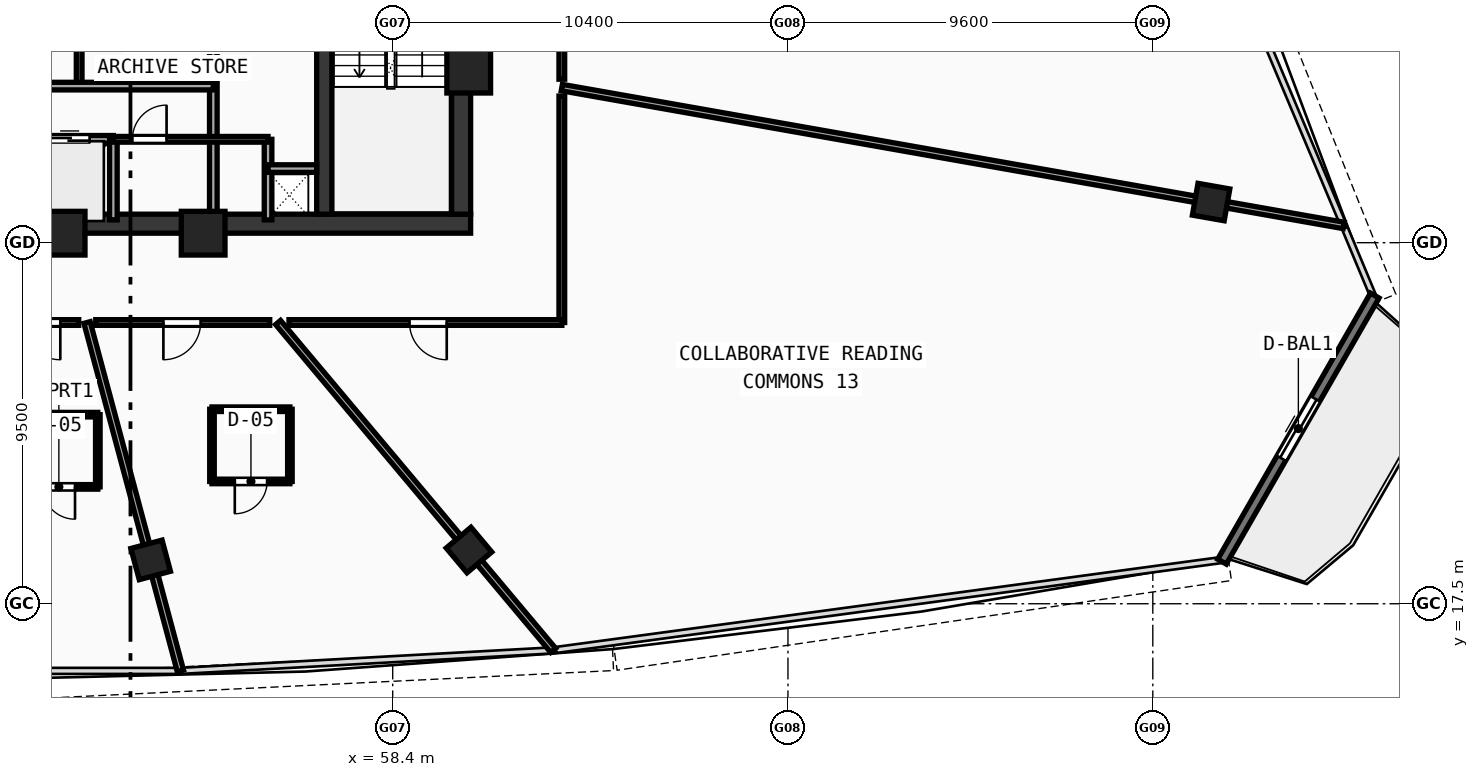
"""IFC4 building model, lengths in metres.
Left out: names, types, materials, properties, quantities, classifications, styles, units other than length and angle.
Written with IfcOpenShell. Run it as: python <this file> out.ifc"""

import sys

from ifc_helpers import new_model, si_unit, direction, frame, frame_2d, origin, origin_with_axes, origin_2d, place, context, subcontext, project, spatial, rectangle, hollow_rectangle, extrude, source, transform, mapped, element, fill, save


model = new_model("IFC4")
c1 = context("Model", 3, precision=1e-05, world=origin(), true_north=direction((0.0, 1.0)))
c2 = subcontext(c1, "Body", "Model", "MODEL_VIEW")
j1 = project(units=[si_unit("LENGTHUNIT", "METRE"), si_unit("PLANEANGLEUNIT", "RADIAN")], contexts=[c1])
p1 = place(None, origin())
s1 = spatial("IfcSite", under=j1, at=p1, CompositionType="ELEMENT")
p2 = place(p1, origin())
s2 = spatial("IfcBuilding", under=s1, at=p2, CompositionType="ELEMENT")
p3 = place(p2, frame((0.0, 0.0, 229.61)))
s3 = spatial("IfcBuildingStorey", under=s2, at=p3, CompositionType="ELEMENT", Elevation=229.61)
p4 = place(p3, frame((35.55, 27.5, 0.0), z_axis=(0.0, 0.0, 1.0), x_axis=(1.0, 0.0, 0.0)))
e1 = element("IfcWall", 1, at=p4, inside=s3, PredefinedType="SHEAR", context=c2, shape_type="SweptSolid", body=[
    extrude(rectangle(XDim=24.9, YDim=0.5, at=frame_2d((12.45, 0.0))), origin(), (0.0, 0.0, 1.0), 3.47),
])
p5 = place(p3, frame((60.2, 27.75, 0.0), z_axis=(0.0, 0.0, 1.0), x_axis=(0.0, 1.0, 0.0)))
e2 = element("IfcWall", 2, at=p5, inside=s3, PredefinedType="SHEAR", context=c2, shape_type="SweptSolid", body=[
    extrude(rectangle(XDim=12.2, YDim=0.5, at=frame_2d((6.1, 0.0))), origin(), (0.0, 0.0, 1.0), 3.47),
])
p6 = place(p3, frame((56.6, 27.75, 0.0), z_axis=(0.0, 0.0, 1.0), x_axis=(0.0, 1.0, 0.0)))
e3 = element("IfcWall", 3, at=p6, inside=s3, PredefinedType="SHEAR", context=c2, shape_type="SweptSolid", body=[
    extrude(rectangle(XDim=12.2, YDim=0.4, at=frame_2d((6.1, 0.0))), origin(), (0.0, 0.0, 1.0), 3.47),
])
p7 = place(p6, frame((10.0, 0.0, 0.0)))
e4 = element("IfcOpeningElement", 4, at=p7, cuts=e3, PredefinedType="OPENING", context=c2, shape_type="SweptSolid", body=[
    extrude(rectangle(XDim=1.1, YDim=2.1, at=frame_2d((0.55, 1.05))), frame((0.0, 0.21, 0.0), z_axis=(0.0, -1.0, 0.0), x_axis=(1.0, 0.0, 0.0)), (0.0, 0.0, 1.0), 0.42),
])
m1 = source(origin(), c2, "Body", "SweptSolid", [
    extrude(hollow_rectangle(XDim=1.15, YDim=1.15, WallThickness=0.048, at=origin_2d()), origin(), (0.0, 0.0, 1.0), 3.73),
])
for number, where, z_axis, x_axis in (
    (5, (49.729, 27.25, -0.26), (0.0, 0.0, 1.0), (1.0, 0.0, 0.0)),
    (6, (53.412, 27.25, -0.26), (0.0, 0.0, 1.0), (1.0, 0.0, 0.0)),
    (7, (60.4, 31.513, -0.26), (0.0, 0.0, 1.0), (1.0, 0.0, 0.0)),
):
    element("IfcColumn", number, at=place(p3, frame(where, z_axis=z_axis, x_axis=x_axis)), inside=s3, PredefinedType="COLUMN", context=c2, shape_type="MappedRepresentation", body=[
        mapped(m1, transform((0.0, 0.0, 0.0), scale=1.0)),
    ])
m2 = source(origin(), c2, "Body", "SweptSolid", [
    extrude(hollow_rectangle(XDim=0.85, YDim=0.85, WallThickness=0.034, at=origin_2d()), origin(), (0.0, 0.0, 1.0), 3.73),
])
for number, where, z_axis, x_axis in (
    (8, (52.031, 18.654, -0.26), (0.0, 0.0, 1.0), (0.966, 0.259, 0.0)),
    (9, (60.407, 18.914, -0.26), (0.0, 0.0, 1.0), (0.766, 0.643, 0.0)),
    (10, (79.934, 28.069, -0.26), (0.0, 0.0, 1.0), (0.174, 0.985, 0.0)),
):
    element("IfcColumn", number, at=place(p3, frame(where, z_axis=z_axis, x_axis=x_axis)), inside=s3, PredefinedType="COLUMN", context=c2, shape_type="MappedRepresentation", body=[
        mapped(m2, transform((0.0, 0.0, 0.0), scale=1.0)),
    ])
p8 = place(p3, frame((80.22, 18.608, 0.0), z_axis=(0.0, 0.0, 1.0), x_axis=(0.49791595327, 0.867225289921, 0.0)))
e11 = element("IfcWall", 11, at=p8, inside=s3, PredefinedType="STANDARD", context=c2, shape_type="SweptSolid", body=[
    extrude(rectangle(XDim=8.074, YDim=0.26, at=frame_2d((4.037, 0.0))), origin(), (0.0, 0.0, 1.0), 3.47),
])
p9 = place(p8, frame((3.137, 0.0, 0.0)))
e12 = element("IfcOpeningElement", 12, at=p9, cuts=e11, PredefinedType="OPENING", context=c2, shape_type="SweptSolid", body=[
    extrude(rectangle(XDim=1.8, YDim=2.15, at=frame_2d((0.9, 1.075))), frame((0.0, 0.14, 0.0), z_axis=(0.0, -1.0, 0.0), x_axis=(1.0, 0.0, 0.0)), (0.0, 0.0, 1.0), 0.28),
])
p10 = place(p3, frame((53.68, 27.6, 0.0), z_axis=(0.0, 0.0, 1.0), x_axis=(0.0, 1.0, 0.0)))
e13 = element("IfcWall", 13, at=p10, inside=s3, PredefinedType="SOLIDWALL", context=c2, shape_type="SweptSolid", body=[
    extrude(rectangle(XDim=9.05, YDim=0.2, at=frame_2d((4.525, 0.0))), origin(), (0.0, 0.0, 1.0), 3.47),
])
p11 = place(p10, frame((6.9, 0.0, 0.0)))
e14 = element("IfcOpeningElement", 14, at=p11, cuts=e13, PredefinedType="OPENING", context=c2, shape_type="SweptSolid", body=[
    extrude(rectangle(XDim=1.05, YDim=2.1, at=frame_2d((0.525, 1.05))), frame((0.0, 0.11, 0.0), z_axis=(0.0, -1.0, 0.0), x_axis=(1.0, 0.0, 0.0)), (0.0, 0.0, 1.0), 0.22),
])
p12 = place(p3, frame((50.15, 31.12, 0.0), z_axis=(0.0, 0.0, 1.0), x_axis=(0.0, 1.0, 0.0)))
e15 = element("IfcWall", 15, at=p12, inside=s3, PredefinedType="PARTITIONING", context=c2, shape_type="SweptSolid", body=[
    extrude(rectangle(XDim=2.7, YDim=0.15, at=frame_2d((1.35, 0.0))), origin(), (0.0, 0.0, 1.0), 3.47),
])
p13 = place(p3, frame((43.85, 29.72, 0.0), z_axis=(0.0, 0.0, 1.0), x_axis=(1.0, 0.0, 0.0)))
e16 = element("IfcWall", 16, at=p13, inside=s3, PredefinedType="SOLIDWALL", context=c2, shape_type="SweptSolid", body=[
    extrude(rectangle(XDim=7.2, YDim=0.2, at=frame_2d((3.6, 0.0))), origin(), (0.0, 0.0, 1.0), 3.47),
])
p14 = place(p13, frame((0.625, 0.0, 0.0)))
e17 = element("IfcOpeningElement", 17, at=p14, cuts=e16, PredefinedType="OPENING", context=c2, shape_type="SweptSolid", body=[
    extrude(rectangle(XDim=1.05, YDim=2.1, at=frame_2d((0.525, 1.05))), frame((0.0, 0.11, 0.0), z_axis=(0.0, -1.0, 0.0), x_axis=(1.0, 0.0, 0.0)), (0.0, 0.0, 1.0), 0.22),
])
p15 = place(p13, frame((3.075, 0.0, 0.0)))
e18 = element("IfcOpeningElement", 18, at=p15, cuts=e16, PredefinedType="OPENING", context=c2, shape_type="SweptSolid", body=[
    extrude(rectangle(XDim=1.05, YDim=2.1, at=frame_2d((0.525, 1.05))), frame((0.0, 0.11, 0.0), z_axis=(0.0, -1.0, 0.0), x_axis=(1.0, 0.0, 0.0)), (0.0, 0.0, 1.0), 0.22),
])
p16 = place(p13, frame((5.525, 0.0, 0.0)))
e19 = element("IfcOpeningElement", 19, at=p16, cuts=e16, PredefinedType="OPENING", context=c2, shape_type="SweptSolid", body=[
    extrude(rectangle(XDim=1.05, YDim=2.1, at=frame_2d((0.525, 1.05))), frame((0.0, 0.11, 0.0), z_axis=(0.0, -1.0, 0.0), x_axis=(1.0, 0.0, 0.0)), (0.0, 0.0, 1.0), 0.22),
])
p17 = place(p3, frame((51.05, 27.6, 0.0), z_axis=(0.0, 0.0, 1.0), x_axis=(0.0, 1.0, 0.0)))
e20 = element("IfcWall", 20, at=p17, inside=s3, PredefinedType="SOLIDWALL", context=c2, shape_type="SweptSolid", body=[
    extrude(rectangle(XDim=2.12, YDim=0.2, at=frame_2d((1.06, 0.0))), origin(), (0.0, 0.0, 1.0), 3.47),
])
p18 = place(p3, frame((43.85, 31.12, 0.0), z_axis=(0.0, 0.0, 1.0), x_axis=(1.0, 0.0, 0.0)))
e21 = element("IfcWall", 21, at=p18, inside=s3, PredefinedType="SOLIDWALL", context=c2, shape_type="SweptSolid", body=[
    extrude(rectangle(XDim=9.83, YDim=0.2, at=frame_2d((4.915, 0.0))), origin(), (0.0, 0.0, 1.0), 3.47),
])
p19 = place(p3, frame((55.12, 27.6, 0.0), z_axis=(0.0, 0.0, 1.0), x_axis=(0.0, 1.0, 0.0)))
e22 = element("IfcWall", 22, at=p19, inside=s3, PredefinedType="SOLIDWALL", context=c2, shape_type="SweptSolid", body=[
    extrude(rectangle(XDim=2.12, YDim=0.2, at=frame_2d((1.06, 0.0))), origin(), (0.0, 0.0, 1.0), 3.47),
])
p20 = place(p3, frame((55.12, 28.95, 0.0), z_axis=(0.0, 0.0, 1.0), x_axis=(1.0, 0.0, 0.0)))
e23 = element("IfcWall", 23, at=p20, inside=s3, PredefinedType="SOLIDWALL", context=c2, shape_type="SweptSolid", body=[
    extrude(rectangle(XDim=1.28, YDim=0.2, at=frame_2d((0.64, 0.0))), origin(), (0.0, 0.0, 1.0), 3.47),
])
p21 = place(p3, frame((51.05, 29.72, 0.0), z_axis=(0.0, 0.0, 1.0), x_axis=(1.0, 0.0, 0.0)))
e24 = element("IfcWall", 24, at=p21, inside=s3, PredefinedType="PARTITIONING", context=c2, shape_type="SweptSolid", body=[
    extrude(rectangle(XDim=4.07, YDim=0.15, at=frame_2d((2.035, 0.0))), origin(), (0.0, 0.0, 1.0), 3.47),
])
p22 = place(p21, frame((0.5, 0.0, 0.0)))
e25 = element("IfcOpeningElement", 25, at=p22, cuts=e24, PredefinedType="OPENING", context=c2, shape_type="SweptSolid", body=[
    extrude(rectangle(XDim=0.9, YDim=2.1, at=frame_2d((0.45, 1.05))), frame((0.0, 0.085, 0.0), z_axis=(0.0, -1.0, 0.0), x_axis=(1.0, 0.0, 0.0)), (0.0, 0.0, 1.0), 0.17),
])
p23 = place(p3, frame((50.358, 24.9, 0.0), z_axis=(0.0, 0.0, 1.0), x_axis=(0.258832957733, -0.965922098304, 0.0)))
e26 = element("IfcWall", 26, at=p23, inside=s3, PredefinedType="PARTITIONING", context=c2, shape_type="SweptSolid", body=[
    extrude(rectangle(XDim=9.49, YDim=0.17, at=frame_2d((4.745, 0.0))), origin(), (0.0, 0.0, 1.0), 2.82),
])
p24 = place(p3, frame((55.384, 24.9, 0.0), z_axis=(0.0, 0.0, 1.0), x_axis=(0.642803558478, -0.766031060211, 0.0)))
e27 = element("IfcWall", 27, at=p24, inside=s3, PredefinedType="PARTITIONING", context=c2, shape_type="SweptSolid", body=[
    extrude(rectangle(XDim=11.261, YDim=0.17, at=frame_2d((5.631, 0.0))), origin(), (0.0, 0.0, 1.0), 2.82),
])
p25 = place(p3, frame((62.85, 31.082, 0.0), z_axis=(0.0, 0.0, 1.0), x_axis=(0.984808138799, -0.17364598975, 0.0)))
e28 = element("IfcWall", 28, at=p25, inside=s3, PredefinedType="PARTITIONING", context=c2, shape_type="SweptSolid", body=[
    extrude(rectangle(XDim=20.89, YDim=0.17, at=frame_2d((10.445, 0.0))), origin(), (0.0, 0.0, 1.0), 2.82),
])
p26 = place(p3, frame((62.85, 40.723, 0.0), z_axis=(0.0, 0.0, 1.0), x_axis=(0.0, -1.0, 0.0)))
e29 = element("IfcWall", 29, at=p26, inside=s3, PredefinedType="PARTITIONING", context=c2, shape_type="SweptSolid", body=[
    extrude(rectangle(XDim=9.422, YDim=0.15, at=frame_2d((4.711, 0.0))), origin(), (0.0, 0.0, 1.0), 2.82),
])
p27 = place(p26, frame((4.236, 0.0, 0.0)))
e30 = element("IfcOpeningElement", 30, at=p27, cuts=e29, PredefinedType="OPENING", context=c2, shape_type="SweptSolid", body=[
    extrude(rectangle(XDim=0.98, YDim=2.12, at=frame_2d((0.49, 1.06))), frame((0.0, 0.085, 0.0), z_axis=(0.0, -1.0, 0.0), x_axis=(1.0, 0.0, 0.0)), (0.0, 0.0, 1.0), 0.17),
])
p28 = place(p3, frame((62.85, 30.858, 0.0), z_axis=(0.0, 0.0, 1.0), x_axis=(0.0, -1.0, 0.0)))
e31 = element("IfcWall", 31, at=p28, inside=s3, PredefinedType="PARTITIONING", context=c2, shape_type="SweptSolid", body=[
    extrude(rectangle(XDim=5.958, YDim=0.15, at=frame_2d((2.979, 0.0))), origin(), (0.0, 0.0, 1.0), 3.12),
])
p29 = place(p3, frame((62.85, 24.9, 0.0), z_axis=(0.0, 0.0, 1.0), x_axis=(-1.0, 0.0, 0.0)))
e32 = element("IfcWall", 32, at=p29, inside=s3, PredefinedType="PARTITIONING", context=c2, shape_type="SweptSolid", body=[
    extrude(rectangle(XDim=7.179, YDim=0.15, at=frame_2d((3.589, 0.0))), origin(), (0.0, 0.0, 1.0), 3.12),
])
p30 = place(p29, frame((3.028, 0.0, 0.0)))
e33 = element("IfcOpeningElement", 33, at=p30, cuts=e32, PredefinedType="OPENING", context=c2, shape_type="SweptSolid", body=[
    extrude(rectangle(XDim=0.98, YDim=2.12, at=frame_2d((0.49, 1.06))), frame((0.0, 0.085, 0.0), z_axis=(0.0, -1.0, 0.0), x_axis=(1.0, 0.0, 0.0)), (0.0, 0.0, 1.0), 0.17),
])
p31 = place(p3, frame((55.164, 24.9, 0.0), z_axis=(0.0, 0.0, 1.0), x_axis=(-1.0, 0.0, 0.0)))
e34 = element("IfcWall", 34, at=p31, inside=s3, PredefinedType="PARTITIONING", context=c2, shape_type="SweptSolid", body=[
    extrude(rectangle(XDim=4.579, YDim=0.15, at=frame_2d((2.289, 0.0))), origin(), (0.0, 0.0, 1.0), 2.82),
])
p32 = place(p31, frame((1.818, 0.0, 0.0)))
e35 = element("IfcOpeningElement", 35, at=p32, cuts=e34, PredefinedType="OPENING", context=c2, shape_type="SweptSolid", body=[
    extrude(rectangle(XDim=0.98, YDim=2.12, at=frame_2d((0.49, 1.06))), frame((0.0, 0.085, 0.0), z_axis=(0.0, -1.0, 0.0), x_axis=(1.0, 0.0, 0.0)), (0.0, 0.0, 1.0), 0.17),
])
p33 = place(p3, frame((50.138, 24.9, 0.0), z_axis=(0.0, 0.0, 1.0), x_axis=(-1.0, 0.0, 0.0)))
e36 = element("IfcWall", 36, at=p33, inside=s3, PredefinedType="PARTITIONING", context=c2, shape_type="SweptSolid", body=[
    extrude(rectangle(XDim=1.918, YDim=0.15, at=frame_2d((0.959, 0.0))), origin(), (0.0, 0.0, 1.0), 3.47),
])
p34 = place(p33, frame((0.484, 0.0, 0.0)))
e37 = element("IfcOpeningElement", 37, at=p34, cuts=e36, PredefinedType="OPENING", context=c2, shape_type="SweptSolid", body=[
    extrude(rectangle(XDim=0.98, YDim=2.12, at=frame_2d((0.49, 1.06))), frame((0.0, 0.085, 0.0), z_axis=(0.0, -1.0, 0.0), x_axis=(1.0, 0.0, 0.0)), (0.0, 0.0, 1.0), 0.17),
])
p35 = place(p3, frame((48.591, 20.575, 0.0), z_axis=(0.0, 0.0, 1.0), x_axis=(1.0, 0.0, 0.0)))
e38 = element("IfcWall", 38, at=p35, inside=s3, PredefinedType="PARTITIONING", context=c2, shape_type="SweptSolid", body=[
    extrude(rectangle(XDim=2.05, YDim=0.12, at=frame_2d((1.025, 0.0))), origin(), (0.0, 0.0, 1.0), 3.47),
])
p36 = place(p35, frame((0.6, 0.0, 0.0)))
e39 = element("IfcOpeningElement", 39, at=p36, cuts=e38, PredefinedType="OPENING", context=c2, shape_type="SweptSolid", body=[
    extrude(rectangle(XDim=0.85, YDim=2.1, at=frame_2d((0.425, 1.05))), frame((0.0, 0.07, 0.0), z_axis=(0.0, -1.0, 0.0), x_axis=(1.0, 0.0, 0.0)), (0.0, 0.0, 1.0), 0.14),
])
p37 = place(p3, frame((50.641, 20.575, 0.0), z_axis=(0.0, 0.0, 1.0), x_axis=(0.0, 1.0, 0.0)))
e40 = element("IfcWall", 40, at=p37, inside=s3, PredefinedType="PARTITIONING", context=c2, shape_type="SweptSolid", body=[
    extrude(rectangle(XDim=1.9, YDim=0.12, at=frame_2d((0.95, 0.0))), origin(), (0.0, 0.0, 1.0), 3.12),
])
p38 = place(p3, frame((50.641, 22.475, 0.0), z_axis=(0.0, 0.0, 1.0), x_axis=(-1.0, 0.0, 0.0)))
e41 = element("IfcWall", 41, at=p38, inside=s3, PredefinedType="PARTITIONING", context=c2, shape_type="SweptSolid", body=[
    extrude(rectangle(XDim=2.05, YDim=0.12, at=frame_2d((1.025, 0.0))), origin(), (0.0, 0.0, 1.0), 3.47),
])
p39 = place(p3, frame((53.645, 20.718, 0.0), z_axis=(0.0, 0.0, 1.0), x_axis=(1.0, 0.0, 0.0)))
e42 = element("IfcWall", 42, at=p39, inside=s3, PredefinedType="PARTITIONING", context=c2, shape_type="SweptSolid", body=[
    extrude(rectangle(XDim=2.05, YDim=0.12, at=frame_2d((1.025, 0.0))), origin(), (0.0, 0.0, 1.0), 3.47),
])
p40 = place(p39, frame((0.6, 0.0, 0.0)))
e43 = element("IfcOpeningElement", 43, at=p40, cuts=e42, PredefinedType="OPENING", context=c2, shape_type="SweptSolid", body=[
    extrude(rectangle(XDim=0.85, YDim=2.1, at=frame_2d((0.425, 1.05))), frame((0.0, 0.07, 0.0), z_axis=(0.0, -1.0, 0.0), x_axis=(1.0, 0.0, 0.0)), (0.0, 0.0, 1.0), 0.14),
])
p41 = place(p3, frame((55.695, 20.718, 0.0), z_axis=(0.0, 0.0, 1.0), x_axis=(0.0, 1.0, 0.0)))
e44 = element("IfcWall", 44, at=p41, inside=s3, PredefinedType="PARTITIONING", context=c2, shape_type="SweptSolid", body=[
    extrude(rectangle(XDim=1.9, YDim=0.12, at=frame_2d((0.95, 0.0))), origin(), (0.0, 0.0, 1.0), 3.12),
])
p42 = place(p3, frame((55.695, 22.618, 0.0), z_axis=(0.0, 0.0, 1.0), x_axis=(-1.0, 0.0, 0.0)))
e45 = element("IfcWall", 45, at=p42, inside=s3, PredefinedType="PARTITIONING", context=c2, shape_type="SweptSolid", body=[
    extrude(rectangle(XDim=2.05, YDim=0.12, at=frame_2d((1.025, 0.0))), origin(), (0.0, 0.0, 1.0), 3.47),
])
p43 = place(p3, frame((53.645, 22.618, 0.0), z_axis=(0.0, 0.0, 1.0), x_axis=(0.0, -1.0, 0.0)))
e46 = element("IfcWall", 46, at=p43, inside=s3, PredefinedType="PARTITIONING", context=c2, shape_type="SweptSolid", body=[
    extrude(rectangle(XDim=1.9, YDim=0.12, at=frame_2d((0.95, 0.0))), origin(), (0.0, 0.0, 1.0), 3.12),
])
m3 = source(origin(), c2, "Body", "SweptSolid", [
    extrude(rectangle(XDim=1.8, YDim=2.15, at=frame_2d((0.9, 1.075))), frame((0.0, 0.025, 0.0), z_axis=(0.0, -1.0, 0.0), x_axis=(1.0, 0.0, 0.0)), (0.0, 0.0, 1.0), 0.05),
])
p44 = place(p9, origin_with_axes())
e47 = element("IfcDoor", 47, at=p44, inside=s3, OperationType="DOUBLE_DOOR_SLIDING", PredefinedType="DOOR", context=c2, shape_type="MappedRepresentation", body=[
    mapped(m3, transform((0.0, 0.0, 0.0), scale=1.0)),
])
fill(e12, e47)
m4 = source(origin(), c2, "Body", "SweptSolid", [
    extrude(rectangle(XDim=1.05, YDim=2.1, at=frame_2d((0.525, 1.05))), frame((0.0, 0.025, 0.0), z_axis=(0.0, -1.0, 0.0), x_axis=(1.0, 0.0, 0.0)), (0.0, 0.0, 1.0), 0.05),
])
p45 = place(p16, origin_with_axes())
e48 = element("IfcDoor", 48, at=p45, inside=s3, OperationType="DOUBLE_DOOR_SLIDING", PredefinedType="DOOR", context=c2, shape_type="MappedRepresentation", body=[
    mapped(m4, transform((0.0, 0.0, 0.0), scale=1.0)),
])
fill(e19, e48)
m5 = source(origin(), c2, "Body", "SweptSolid", [
    extrude(rectangle(XDim=0.9, YDim=2.1, at=frame_2d((0.45, 1.05))), frame((0.0, 0.025, 0.0), z_axis=(0.0, -1.0, 0.0), x_axis=(1.0, 0.0, 0.0)), (0.0, 0.0, 1.0), 0.05),
])
p46 = place(p22, origin_with_axes())
e49 = element("IfcDoor", 49, at=p46, inside=s3, OperationType="SINGLE_SWING_RIGHT", PredefinedType="DOOR", context=c2, shape_type="MappedRepresentation", body=[
    mapped(m5, transform((0.0, 0.0, 0.0), scale=1.0)),
])
fill(e25, e49)
m6 = source(origin(), c2, "Body", "SweptSolid", [
    extrude(rectangle(XDim=0.98, YDim=2.12, at=frame_2d((0.49, 1.06))), frame((0.0, 0.025, 0.0), z_axis=(0.0, -1.0, 0.0), x_axis=(1.0, 0.0, 0.0)), (0.0, 0.0, 1.0), 0.05),
])
p47 = place(p34, origin_with_axes())
e50 = element("IfcDoor", 50, at=p47, inside=s3, OperationType="SINGLE_SWING_LEFT", PredefinedType="DOOR", context=c2, shape_type="MappedRepresentation", body=[
    mapped(m6, transform((0.0, 0.0, 0.0), scale=1.0)),
])
fill(e37, e50)
m7 = source(origin(), c2, "Body", "SweptSolid", [
    extrude(rectangle(XDim=0.85, YDim=2.1, at=frame_2d((0.425, 1.05))), frame((0.0, 0.025, 0.0), z_axis=(0.0, -1.0, 0.0), x_axis=(1.0, 0.0, 0.0)), (0.0, 0.0, 1.0), 0.05),
])
p48 = place(p36, frame((0.85, 0.0, 0.0), z_axis=(0.0, 0.0, 1.0), x_axis=(-1.0, 0.0, 0.0)))
e51 = element("IfcDoor", 51, at=p48, inside=s3, OperationType="SINGLE_SWING_LEFT", PredefinedType="DOOR", context=c2, shape_type="MappedRepresentation", body=[
    mapped(m7, transform((0.0, 0.0, 0.0), scale=1.0)),
])
fill(e39, e51)
p49 = place(p32, origin_with_axes())
e52 = element("IfcDoor", 52, at=p49, inside=s3, OperationType="SINGLE_SWING_RIGHT", PredefinedType="DOOR", context=c2, shape_type="MappedRepresentation", body=[
    mapped(m6, transform((0.0, 0.0, 0.0), scale=1.0)),
])
fill(e35, e52)
p50 = place(p40, frame((0.85, 0.0, 0.0), z_axis=(0.0, 0.0, 1.0), x_axis=(-1.0, 0.0, 0.0)))
e53 = element("IfcDoor", 53, at=p50, inside=s3, OperationType="SINGLE_SWING_RIGHT", PredefinedType="DOOR", context=c2, shape_type="MappedRepresentation", body=[
    mapped(m7, transform((0.0, 0.0, 0.0), scale=1.0)),
])
fill(e43, e53)
p51 = place(p30, origin_with_axes())
e54 = element("IfcDoor", 54, at=p51, inside=s3, OperationType="SINGLE_SWING_LEFT", PredefinedType="DOOR", context=c2, shape_type="MappedRepresentation", body=[
    mapped(m6, transform((0.0, 0.0, 0.0), scale=1.0)),
])
fill(e33, e54)
save(model, sys.argv[1])
